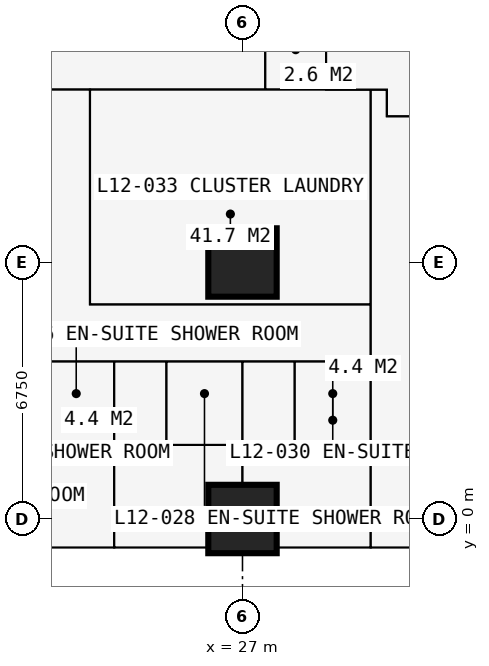
"""IFC4 building model, lengths in metres.
Left out: names, types, materials, properties, quantities, classifications, styles, units other than length and angle.
Written with IfcOpenShell. Run it as: python <this file> out.ifc"""

import sys

from ifc_helpers import new_model, si_unit, direction, frame, frame_2d, origin, origin_2d, place, context, subcontext, project, spatial, rectangle, extrude, element, fill, save


model = new_model("IFC4")
c1 = context("Model", 3, precision=1e-05, world=origin(), true_north=direction((0.0, 1.0)))
c2 = subcontext(c1, "Body", "Model", "MODEL_VIEW")
j1 = project(units=[si_unit("LENGTHUNIT", "METRE"), si_unit("PLANEANGLEUNIT", "RADIAN")], contexts=[c1])
p1 = place(None, origin())
s1 = spatial("IfcSite", under=j1, at=p1, CompositionType="ELEMENT")
p2 = place(p1, origin())
s2 = spatial("IfcBuilding", under=s1, at=p2, CompositionType="ELEMENT")
p3 = place(p2, frame((0.0, 0.0, 46.8)))
s3 = spatial("IfcBuildingStorey", under=s2, at=p3, CompositionType="ELEMENT", Elevation=46.8)
for number, where, z_axis, x_axis in (
    (1, (27.0, 0.0, 0.0), (0.0, 0.0, 1.0), (1.0, 0.0, 0.0)),
    (2, (27.0, 6.75, 0.0), (0.0, 0.0, 1.0), (1.0, 0.0, 0.0)),
):
    element("IfcColumn", number, at=place(p3, frame(where, z_axis=z_axis, x_axis=x_axis)), inside=s3, PredefinedType="COLUMN", context=c2, shape_type="SweptSolid", body=[
        extrude(rectangle(XDim=1.8, YDim=1.8, at=origin_2d()), origin(), (0.0, 0.0, 1.0), 3.6),
    ])
p4 = place(p3, frame((27.0, -0.75, 0.0), z_axis=(0.0, 0.0, 1.0), x_axis=(-1.0, 0.0, 0.0)))
e3 = element("IfcWall", 3, at=p4, inside=s3, PredefinedType="SOLIDWALL", context=c2, shape_type="SweptSolid", body=[
    extrude(rectangle(XDim=6.75, YDim=0.15, at=frame_2d((3.375, 0.0))), origin(), (0.0, 0.0, 1.0), 3.375),
])
p5 = place(p4, frame((0.962, 0.0, 0.0)))
e4 = element("IfcOpeningElement", 4, at=p5, cuts=e3, PredefinedType="OPENING", context=c2, shape_type="SweptSolid", body=[
    extrude(rectangle(XDim=1.0, YDim=2.2, at=frame_2d((0.5, 1.1))), frame((0.0, 0.085, 0.0), z_axis=(0.0, -1.0, 0.0), x_axis=(1.0, 0.0, 0.0)), (0.0, 0.0, 1.0), 0.17),
])
p6 = place(p4, frame((2.025, 0.0, 0.9)))
e5 = element("IfcOpeningElement", 5, at=p6, cuts=e3, PredefinedType="OPENING", context=c2, shape_type="SweptSolid", body=[
    extrude(rectangle(XDim=1.2, YDim=1.8, at=frame_2d((0.6, 0.9))), frame((0.0, 0.085, 0.0), z_axis=(0.0, -1.0, 0.0), x_axis=(1.0, 0.0, 0.0)), (0.0, 0.0, 1.0), 0.17),
])
p7 = place(p4, frame((4.788, 0.0, 0.0)))
e6 = element("IfcOpeningElement", 6, at=p7, cuts=e3, PredefinedType="OPENING", context=c2, shape_type="SweptSolid", body=[
    extrude(rectangle(XDim=1.0, YDim=2.2, at=frame_2d((0.5, 1.1))), frame((0.0, 0.085, 0.0), z_axis=(0.0, -1.0, 0.0), x_axis=(1.0, 0.0, 0.0)), (0.0, 0.0, 1.0), 0.17),
])
p8 = place(p4, frame((3.525, 0.0, 0.9)))
e7 = element("IfcOpeningElement", 7, at=p8, cuts=e3, PredefinedType="OPENING", context=c2, shape_type="SweptSolid", body=[
    extrude(rectangle(XDim=1.2, YDim=1.8, at=frame_2d((0.6, 0.9))), frame((0.0, 0.085, 0.0), z_axis=(0.0, -1.0, 0.0), x_axis=(1.0, 0.0, 0.0)), (0.0, 0.0, 1.0), 0.17),
])
p9 = place(p3, frame((23.625, -0.85, 0.0), z_axis=(0.0, 0.0, 1.0), x_axis=(0.0, -1.0, 0.0)))
e8 = element("IfcWall", 8, at=p9, inside=s3, PredefinedType="USERDEFINED", context=c2, shape_type="SweptSolid", body=[
    extrude(rectangle(XDim=2.2, YDim=1.0, at=frame_2d((1.1, 0.0))), origin(), (0.0, 0.0, 1.0), 0.9),
])
p10 = place(p3, frame((6.75, 4.15, 0.0), z_axis=(0.0, 0.0, 1.0), x_axis=(1.0, 0.0, 0.0)))
e9 = element("IfcWall", 9, at=p10, inside=s3, PredefinedType="PARTITIONING", context=c2, shape_type="SweptSolid", body=[
    extrude(rectangle(XDim=23.625, YDim=0.1, at=frame_2d((11.812, 0.0))), origin(), (0.0, 0.0, 1.0), 3.375),
])
p11 = place(p10, frame((0.2, 0.0, 0.0)))
e10 = element("IfcOpeningElement", 10, at=p11, cuts=e9, PredefinedType="OPENING", context=c2, shape_type="SweptSolid", body=[
    extrude(rectangle(XDim=0.95, YDim=2.2, at=frame_2d((0.475, 1.1))), frame((0.0, 0.06, 0.0), z_axis=(0.0, -1.0, 0.0), x_axis=(1.0, 0.0, 0.0)), (0.0, 0.0, 1.0), 0.12),
])
p12 = place(p10, frame((3.625, 0.0, 0.0)))
e11 = element("IfcOpeningElement", 11, at=p12, cuts=e9, PredefinedType="OPENING", context=c2, shape_type="SweptSolid", body=[
    extrude(rectangle(XDim=0.95, YDim=2.2, at=frame_2d((0.475, 1.1))), frame((0.0, 0.06, 0.0), z_axis=(0.0, -1.0, 0.0), x_axis=(1.0, 0.0, 0.0)), (0.0, 0.0, 1.0), 0.12),
])
p13 = place(p10, frame((7.0, 0.0, 0.0)))
e12 = element("IfcOpeningElement", 12, at=p13, cuts=e9, PredefinedType="OPENING", context=c2, shape_type="SweptSolid", body=[
    extrude(rectangle(XDim=0.95, YDim=2.2, at=frame_2d((0.475, 1.1))), frame((0.0, 0.06, 0.0), z_axis=(0.0, -1.0, 0.0), x_axis=(1.0, 0.0, 0.0)), (0.0, 0.0, 1.0), 0.12),
])
p14 = place(p10, frame((10.375, 0.0, 0.0)))
e13 = element("IfcOpeningElement", 13, at=p14, cuts=e9, PredefinedType="OPENING", context=c2, shape_type="SweptSolid", body=[
    extrude(rectangle(XDim=0.95, YDim=2.2, at=frame_2d((0.475, 1.1))), frame((0.0, 0.06, 0.0), z_axis=(0.0, -1.0, 0.0), x_axis=(1.0, 0.0, 0.0)), (0.0, 0.0, 1.0), 0.12),
])
p15 = place(p10, frame((13.75, 0.0, 0.0)))
e14 = element("IfcOpeningElement", 14, at=p15, cuts=e9, PredefinedType="OPENING", context=c2, shape_type="SweptSolid", body=[
    extrude(rectangle(XDim=0.95, YDim=2.2, at=frame_2d((0.475, 1.1))), frame((0.0, 0.06, 0.0), z_axis=(0.0, -1.0, 0.0), x_axis=(1.0, 0.0, 0.0)), (0.0, 0.0, 1.0), 0.12),
])
p16 = place(p10, frame((17.125, 0.0, 0.0)))
e15 = element("IfcOpeningElement", 15, at=p16, cuts=e9, PredefinedType="OPENING", context=c2, shape_type="SweptSolid", body=[
    extrude(rectangle(XDim=0.95, YDim=2.2, at=frame_2d((0.475, 1.1))), frame((0.0, 0.06, 0.0), z_axis=(0.0, -1.0, 0.0), x_axis=(1.0, 0.0, 0.0)), (0.0, 0.0, 1.0), 0.12),
])
p17 = place(p10, frame((20.5, 0.0, 0.0)))
e16 = element("IfcOpeningElement", 16, at=p17, cuts=e9, PredefinedType="OPENING", context=c2, shape_type="SweptSolid", body=[
    extrude(rectangle(XDim=0.95, YDim=2.2, at=frame_2d((0.475, 1.1))), frame((0.0, 0.06, 0.0), z_axis=(0.0, -1.0, 0.0), x_axis=(1.0, 0.0, 0.0)), (0.0, 0.0, 1.0), 0.12),
])
p18 = place(p3, frame((10.125, 11.3, 0.0), z_axis=(0.0, 0.0, 1.0), x_axis=(1.0, 0.0, 0.0)))
e17 = element("IfcWall", 17, at=p18, inside=s3, PredefinedType="PARTITIONING", context=c2, shape_type="SweptSolid", body=[
    extrude(rectangle(XDim=20.675, YDim=0.15, at=frame_2d((10.337, 0.0))), origin(), (0.0, 0.0, 1.0), 3.375),
])
p19 = place(p18, frame((11.312, 0.0, 0.0)))
e18 = element("IfcOpeningElement", 18, at=p19, cuts=e17, PredefinedType="OPENING", context=c2, shape_type="SweptSolid", body=[
    extrude(rectangle(XDim=1.0, YDim=2.2, at=frame_2d((0.5, 1.1))), frame((0.0, 0.085, 0.0), z_axis=(0.0, -1.0, 0.0), x_axis=(1.0, 0.0, 0.0)), (0.0, 0.0, 1.0), 0.17),
])
p20 = place(p3, frame((21.625, 1.95, 0.0), z_axis=(0.0, 0.0, 1.0), x_axis=(1.0, 0.0, 0.0)))
e19 = element("IfcWall", 19, at=p20, inside=s3, PredefinedType="PARTITIONING", context=c2, shape_type="SweptSolid", body=[
    extrude(rectangle(XDim=2.0, YDim=0.1, at=frame_2d((1.0, 0.0))), origin(), (0.0, 0.0, 1.0), 3.375),
])
p21 = place(p3, frame((22.988, 5.65, 0.0), z_axis=(0.0, 0.0, 1.0), x_axis=(1.0, 0.0, 0.0)))
e20 = element("IfcWall", 20, at=p21, inside=s3, PredefinedType="PARTITIONING", context=c2, shape_type="SweptSolid", body=[
    extrude(rectangle(XDim=7.387, YDim=0.15, at=frame_2d((3.694, 0.0))), origin(), (0.0, 0.0, 1.0), 3.375),
])
p22 = place(p21, frame((2.15, 0.0, 0.0)))
e21 = element("IfcOpeningElement", 21, at=p22, cuts=e20, PredefinedType="OPENING", context=c2, shape_type="SweptSolid", body=[
    extrude(rectangle(XDim=0.95, YDim=2.2, at=frame_2d((0.475, 1.1))), frame((0.0, 0.085, 0.0), z_axis=(0.0, -1.0, 0.0), x_axis=(1.0, 0.0, 0.0)), (0.0, 0.0, 1.0), 0.17),
])
p23 = place(p3, frame((22.988, 5.65, 0.0), z_axis=(0.0, 0.0, 1.0), x_axis=(0.0, 1.0, 0.0)))
e22 = element("IfcWall", 22, at=p23, inside=s3, PredefinedType="PARTITIONING", context=c2, shape_type="SweptSolid", body=[
    extrude(rectangle(XDim=5.65, YDim=0.15, at=frame_2d((2.825, 0.0))), origin(), (0.0, 0.0, 1.0), 3.375),
])
p24 = place(p3, frame((23.625, -0.734, 0.0), z_axis=(0.0, 0.0, 1.0), x_axis=(0.0, 1.0, 0.0)))
e23 = element("IfcWall", 23, at=p24, inside=s3, PredefinedType="PARTITIONING", context=c2, shape_type="SweptSolid", body=[
    extrude(rectangle(XDim=4.884, YDim=0.175, at=frame_2d((2.442, 0.0))), origin(), (0.0, 0.0, 1.0), 3.375),
])
p25 = place(p3, frame((25.0, 1.95, 0.0), z_axis=(0.0, 0.0, 1.0), x_axis=(0.0, 1.0, 0.0)))
e24 = element("IfcWall", 24, at=p25, inside=s3, PredefinedType="PARTITIONING", context=c2, shape_type="SweptSolid", body=[
    extrude(rectangle(XDim=2.2, YDim=0.1, at=frame_2d((1.1, 0.0))), origin(), (0.0, 0.0, 1.0), 3.375),
])
p26 = place(p25, frame((0.65, 0.0, 0.0)))
e25 = element("IfcOpeningElement", 25, at=p26, cuts=e24, PredefinedType="OPENING", context=c2, shape_type="SweptSolid", body=[
    extrude(rectangle(XDim=0.9, YDim=2.2, at=frame_2d((0.45, 1.1))), frame((0.0, 0.06, 0.0), z_axis=(0.0, -1.0, 0.0), x_axis=(1.0, 0.0, 0.0)), (0.0, 0.0, 1.0), 0.12),
])
p27 = place(p3, frame((25.0, 1.95, 0.0), z_axis=(0.0, 0.0, 1.0), x_axis=(1.0, 0.0, 0.0)))
e26 = element("IfcWall", 26, at=p27, inside=s3, PredefinedType="PARTITIONING", context=c2, shape_type="SweptSolid", body=[
    extrude(rectangle(XDim=2.0, YDim=0.1, at=frame_2d((1.0, 0.0))), origin(), (0.0, 0.0, 1.0), 3.375),
])
p28 = place(p3, frame((27.0, -0.734, 0.0), z_axis=(0.0, 0.0, 1.0), x_axis=(0.0, 1.0, 0.0)))
e27 = element("IfcWall", 27, at=p28, inside=s3, PredefinedType="PARTITIONING", context=c2, shape_type="SweptSolid", body=[
    extrude(rectangle(XDim=4.884, YDim=0.175, at=frame_2d((2.442, 0.0))), origin(), (0.0, 0.0, 1.0), 2.61),
])
p29 = place(p3, frame((27.6, 11.3, 0.0), z_axis=(0.0, 0.0, 1.0), x_axis=(0.0, 1.0, 0.0)))
e28 = element("IfcWall", 28, at=p29, inside=s3, PredefinedType="PARTITIONING", context=c2, shape_type="SweptSolid", body=[
    extrude(rectangle(XDim=1.6, YDim=0.15, at=frame_2d((0.8, 0.0))), origin(), (0.0, 0.0, 1.0), 3.375),
])
p30 = place(p29, frame((0.3, 0.0, 0.0)))
e29 = element("IfcOpeningElement", 29, at=p30, cuts=e28, PredefinedType="OPENING", context=c2, shape_type="SweptSolid", body=[
    extrude(rectangle(XDim=0.95, YDim=2.2, at=frame_2d((0.475, 1.1))), frame((0.0, 0.085, 0.0), z_axis=(0.0, -1.0, 0.0), x_axis=(1.0, 0.0, 0.0)), (0.0, 0.0, 1.0), 0.17),
])
p31 = place(p3, frame((28.375, 1.95, 0.0), z_axis=(0.0, 0.0, 1.0), x_axis=(0.0, 1.0, 0.0)))
e30 = element("IfcWall", 30, at=p31, inside=s3, PredefinedType="PARTITIONING", context=c2, shape_type="SweptSolid", body=[
    extrude(rectangle(XDim=2.2, YDim=0.1, at=frame_2d((1.1, 0.0))), origin(), (0.0, 0.0, 1.0), 3.375),
])
p32 = place(p31, frame((0.65, 0.0, 0.0)))
e31 = element("IfcOpeningElement", 31, at=p32, cuts=e30, PredefinedType="OPENING", context=c2, shape_type="SweptSolid", body=[
    extrude(rectangle(XDim=0.9, YDim=2.2, at=frame_2d((0.45, 1.1))), frame((0.0, 0.06, 0.0), z_axis=(0.0, -1.0, 0.0), x_axis=(1.0, 0.0, 0.0)), (0.0, 0.0, 1.0), 0.12),
])
p33 = place(p3, frame((28.375, 1.95, 0.0), z_axis=(0.0, 0.0, 1.0), x_axis=(1.0, 0.0, 0.0)))
e32 = element("IfcWall", 32, at=p33, inside=s3, PredefinedType="PARTITIONING", context=c2, shape_type="SweptSolid", body=[
    extrude(rectangle(XDim=2.0, YDim=0.1, at=frame_2d((1.0, 0.0))), origin(), (0.0, 0.0, 1.0), 3.375),
])
p34 = place(p3, frame((29.2, 11.3, 0.0), z_axis=(0.0, 0.0, 1.0), x_axis=(0.0, 1.0, 0.0)))
e33 = element("IfcWall", 33, at=p34, inside=s3, PredefinedType="PARTITIONING", context=c2, shape_type="SweptSolid", body=[
    extrude(rectangle(XDim=20.3, YDim=0.15, at=frame_2d((10.15, 0.0))), origin(), (0.0, 0.0, 1.0), 3.375),
])
p35 = place(p34, frame((8.35, 0.0, 0.0)))
e34 = element("IfcOpeningElement", 34, at=p35, cuts=e33, PredefinedType="OPENING", context=c2, shape_type="SweptSolid", body=[
    extrude(rectangle(XDim=1.2, YDim=2.2, at=frame_2d((0.6, 1.1))), frame((0.0, 0.085, 0.0), z_axis=(0.0, -1.0, 0.0), x_axis=(1.0, 0.0, 0.0)), (0.0, 0.0, 1.0), 0.17),
])
p36 = place(p3, frame((30.375, -0.734, 0.0), z_axis=(0.0, 0.0, 1.0), x_axis=(0.0, 1.0, 0.0)))
e35 = element("IfcWall", 35, at=p36, inside=s3, PredefinedType="PARTITIONING", context=c2, shape_type="SweptSolid", body=[
    extrude(rectangle(XDim=12.034, YDim=0.15, at=frame_2d((6.017, 0.0))), origin(), (0.0, 0.0, 1.0), 3.375),
])
p37 = place(p3, frame((30.8, 10.6, 0.0), z_axis=(0.0, 0.0, 1.0), x_axis=(0.0, 1.0, 0.0)))
e36 = element("IfcWall", 36, at=p37, inside=s3, PredefinedType="PARTITIONING", context=c2, shape_type="SweptSolid", body=[
    extrude(rectangle(XDim=0.7, YDim=0.15, at=frame_2d((0.35, 0.0))), origin(), (0.0, 0.0, 1.0), 3.375),
])
p38 = place(p3, frame((30.8, 10.6, 0.0), z_axis=(0.0, 0.0, 1.0), x_axis=(1.0, 0.0, 0.0)))
e37 = element("IfcWall", 37, at=p38, inside=s3, PredefinedType="PARTITIONING", context=c2, shape_type="SweptSolid", body=[
    extrude(rectangle(XDim=1.85, YDim=0.15, at=frame_2d((0.925, 0.0))), origin(), (0.0, 0.0, 1.0), 3.375),
])
p39 = place(p5, origin())
e38 = element("IfcDoor", 38, at=p39, inside=s3, OperationType="SINGLE_SWING_LEFT", PredefinedType="DOOR", context=c2, shape_type="SweptSolid", body=[
    extrude(rectangle(XDim=1.0, YDim=2.2, at=frame_2d((0.5, 1.1))), frame((0.0, 0.025, 0.0), z_axis=(0.0, -1.0, 0.0), x_axis=(1.0, 0.0, 0.0)), (0.0, 0.0, 1.0), 0.05),
])
fill(e4, e38)
p40 = place(p6, origin())
e39 = element("IfcWindow", 39, at=p40, inside=s3, PartitioningType="SINGLE_PANEL", PredefinedType="WINDOW", context=c2, shape_type="SweptSolid", body=[
    extrude(rectangle(XDim=1.2, YDim=1.8, at=frame_2d((0.6, 0.9))), frame((0.0, 0.03, 0.0), z_axis=(0.0, -1.0, 0.0), x_axis=(1.0, 0.0, 0.0)), (0.0, 0.0, 1.0), 0.06),
])
fill(e5, e39)
p41 = place(p7, origin())
e40 = element("IfcDoor", 40, at=p41, inside=s3, OperationType="SINGLE_SWING_RIGHT", PredefinedType="DOOR", context=c2, shape_type="SweptSolid", body=[
    extrude(rectangle(XDim=1.0, YDim=2.2, at=frame_2d((0.5, 1.1))), frame((0.0, 0.025, 0.0), z_axis=(0.0, -1.0, 0.0), x_axis=(1.0, 0.0, 0.0)), (0.0, 0.0, 1.0), 0.05),
])
fill(e6, e40)
p42 = place(p8, origin())
e41 = element("IfcWindow", 41, at=p42, inside=s3, PartitioningType="SINGLE_PANEL", PredefinedType="WINDOW", context=c2, shape_type="SweptSolid", body=[
    extrude(rectangle(XDim=1.2, YDim=1.8, at=frame_2d((0.6, 0.9))), frame((0.0, 0.03, 0.0), z_axis=(0.0, -1.0, 0.0), x_axis=(1.0, 0.0, 0.0)), (0.0, 0.0, 1.0), 0.06),
])
fill(e7, e41)
p43 = place(p30, origin())
e42 = element("IfcDoor", 42, at=p43, inside=s3, OperationType="SINGLE_SWING_LEFT", PredefinedType="DOOR", context=c2, shape_type="SweptSolid", body=[
    extrude(rectangle(XDim=0.95, YDim=2.2, at=frame_2d((0.475, 1.1))), frame((0.0, 0.025, 0.0), z_axis=(0.0, -1.0, 0.0), x_axis=(1.0, 0.0, 0.0)), (0.0, 0.0, 1.0), 0.05),
])
fill(e29, e42)
p44 = place(p16, origin())
e43 = element("IfcDoor", 43, at=p44, inside=s3, OperationType="SINGLE_SWING_LEFT", PredefinedType="DOOR", context=c2, shape_type="SweptSolid", body=[
    extrude(rectangle(XDim=0.95, YDim=2.2, at=frame_2d((0.475, 1.1))), frame((0.0, 0.025, 0.0), z_axis=(0.0, -1.0, 0.0), x_axis=(1.0, 0.0, 0.0)), (0.0, 0.0, 1.0), 0.05),
])
fill(e15, e43)
p45 = place(p26, origin())
e44 = element("IfcDoor", 44, at=p45, inside=s3, OperationType="SINGLE_SWING_RIGHT", PredefinedType="DOOR", context=c2, shape_type="SweptSolid", body=[
    extrude(rectangle(XDim=0.9, YDim=2.2, at=frame_2d((0.45, 1.1))), frame((0.0, 0.025, 0.0), z_axis=(0.0, -1.0, 0.0), x_axis=(1.0, 0.0, 0.0)), (0.0, 0.0, 1.0), 0.05),
])
fill(e25, e44)
p46 = place(p17, origin())
e45 = element("IfcDoor", 45, at=p46, inside=s3, OperationType="SINGLE_SWING_LEFT", PredefinedType="DOOR", context=c2, shape_type="SweptSolid", body=[
    extrude(rectangle(XDim=0.95, YDim=2.2, at=frame_2d((0.475, 1.1))), frame((0.0, 0.025, 0.0), z_axis=(0.0, -1.0, 0.0), x_axis=(1.0, 0.0, 0.0)), (0.0, 0.0, 1.0), 0.05),
])
fill(e16, e45)
p47 = place(p32, origin())
e46 = element("IfcDoor", 46, at=p47, inside=s3, OperationType="SINGLE_SWING_RIGHT", PredefinedType="DOOR", context=c2, shape_type="SweptSolid", body=[
    extrude(rectangle(XDim=0.9, YDim=2.2, at=frame_2d((0.45, 1.1))), frame((0.0, 0.025, 0.0), z_axis=(0.0, -1.0, 0.0), x_axis=(1.0, 0.0, 0.0)), (0.0, 0.0, 1.0), 0.05),
])
fill(e31, e46)
p48 = place(p19, origin())
e47 = element("IfcDoor", 47, at=p48, inside=s3, OperationType="SINGLE_SWING_LEFT", PredefinedType="DOOR", context=c2, shape_type="SweptSolid", body=[
    extrude(rectangle(XDim=1.0, YDim=2.2, at=frame_2d((0.5, 1.1))), frame((0.0, 0.025, 0.0), z_axis=(0.0, -1.0, 0.0), x_axis=(1.0, 0.0, 0.0)), (0.0, 0.0, 1.0), 0.05),
])
fill(e18, e47)
p49 = place(p22, origin())
e48 = element("IfcDoor", 48, at=p49, inside=s3, OperationType="SINGLE_SWING_LEFT", PredefinedType="DOOR", context=c2, shape_type="SweptSolid", body=[
    extrude(rectangle(XDim=0.95, YDim=2.2, at=frame_2d((0.475, 1.1))), frame((0.0, 0.025, 0.0), z_axis=(0.0, -1.0, 0.0), x_axis=(1.0, 0.0, 0.0)), (0.0, 0.0, 1.0), 0.05),
])
fill(e21, e48)
save(model, sys.argv[1])
